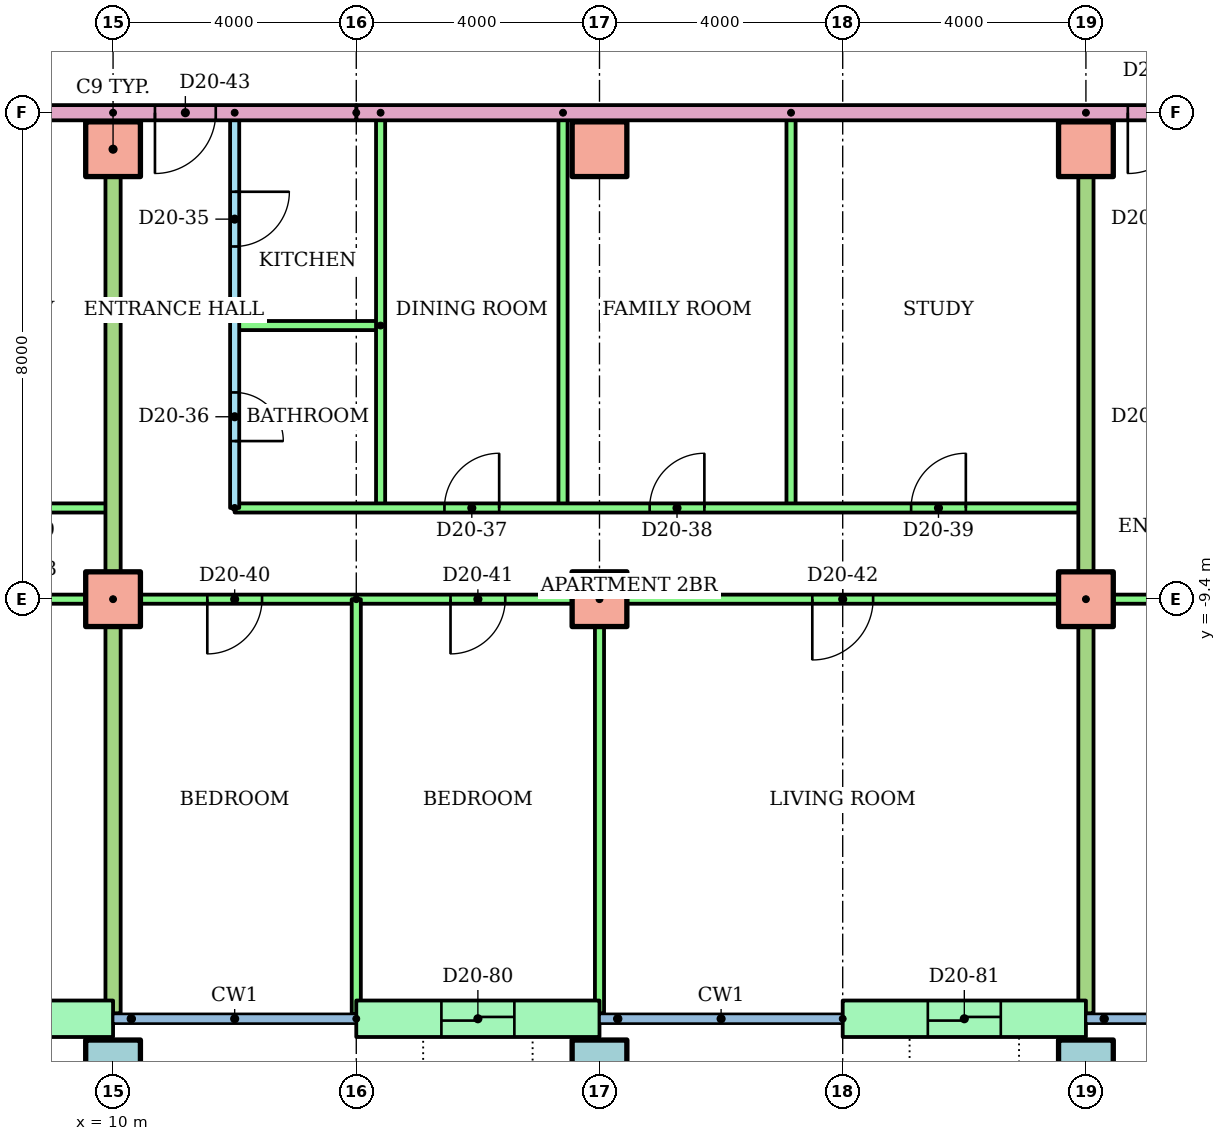
"""IFC4 building model, lengths in metres.
Left out: names, types, materials, properties, quantities, classifications, styles, units other than length and angle.
Written with IfcOpenShell. Run it as: python <this file> out.ifc"""

import sys

from ifc_helpers import new_model, si_unit, direction, frame, frame_2d, origin, origin_2d, place, context, subcontext, project, spatial, rectangle, hollow_rectangle, extrude, element, fill, save


model = new_model("IFC4")
c1 = context("Model", 3, precision=1e-05, world=origin(), true_north=direction((0.0, 1.0)))
c2 = subcontext(c1, "Body", "Model", "MODEL_VIEW")
j1 = project(units=[si_unit("LENGTHUNIT", "METRE"), si_unit("PLANEANGLEUNIT", "RADIAN")], contexts=[c1])
p1 = place(None, origin())
s1 = spatial("IfcSite", under=j1, at=p1, CompositionType="ELEMENT")
p2 = place(p1, origin())
s2 = spatial("IfcBuilding", under=s1, at=p2, CompositionType="ELEMENT")
p3 = place(p2, frame((0.0, 0.0, 80.7)))
s3 = spatial("IfcBuildingStorey", under=s2, at=p3, CompositionType="ELEMENT", Elevation=80.7)
for number, where in (
    (1, (10.0, -17.1, 0.0)),
    (2, (18.0, -17.1, 0.0)),
    (3, (26.0, -17.1, 0.0)),
):
    element("IfcColumn", number, at=place(p3, frame(where)), inside=s3, PredefinedType="COLUMN", context=c2, shape_type="SweptSolid", body=[
        extrude(hollow_rectangle(XDim=0.9, YDim=0.9, WallThickness=0.045, at=origin_2d()), origin(), (0.0, 0.0, 1.0), 3.2),
    ])
for number, where in (
    (4, (10.0, -9.4, 0.0)),
    (5, (18.0, -9.4, 0.0)),
    (6, (26.0, -9.4, 0.0)),
    (7, (10.0, -2.0, 0.0)),
    (8, (18.0, -2.0, 0.0)),
    (9, (26.0, -2.0, 0.0)),
):
    element("IfcColumn", number, at=place(p3, frame(where)), inside=s3, PredefinedType="COLUMN", context=c2, shape_type="SweptSolid", body=[
        extrude(rectangle(XDim=0.9, YDim=0.9, at=origin_2d()), origin(), (0.0, 0.0, 1.0), 3.2),
    ])
p4 = place(p3, frame((6.0, -16.3, 0.0)))
e10 = element("IfcWall", 10, at=p4, inside=s3, PredefinedType="STANDARD", context=c2, shape_type="SweptSolid", body=[
    extrude(rectangle(XDim=4.0, YDim=0.6, at=frame_2d((2.0, 0.0))), origin(), (0.0, 0.0, 1.0), 2.92),
])
p5 = place(p4, frame((1.4, 0.0, 0.0)))
e11 = element("IfcOpeningElement", 11, at=p5, cuts=e10, PredefinedType="OPENING", context=c2, shape_type="SweptSolid", body=[
    extrude(rectangle(XDim=1.2, YDim=2.1, at=frame_2d((0.6, 1.05))), frame((0.0, 0.31, 0.0), z_axis=(0.0, -1.0, 0.0), x_axis=(1.0, 0.0, 0.0)), (0.0, 0.0, 1.0), 0.62),
])
p6 = place(p3, frame((14.0, -16.3, 0.0)))
e12 = element("IfcWall", 12, at=p6, inside=s3, PredefinedType="STANDARD", context=c2, shape_type="SweptSolid", body=[
    extrude(rectangle(XDim=4.0, YDim=0.6, at=frame_2d((2.0, 0.0))), origin(), (0.0, 0.0, 1.0), 2.92),
])
p7 = place(p6, frame((1.4, 0.0, 0.0)))
e13 = element("IfcOpeningElement", 13, at=p7, cuts=e12, PredefinedType="OPENING", context=c2, shape_type="SweptSolid", body=[
    extrude(rectangle(XDim=1.2, YDim=2.1, at=frame_2d((0.6, 1.05))), frame((0.0, 0.31, 0.0), z_axis=(0.0, -1.0, 0.0), x_axis=(1.0, 0.0, 0.0)), (0.0, 0.0, 1.0), 0.62),
])
p8 = place(p3, frame((22.0, -16.3, 0.0)))
e14 = element("IfcWall", 14, at=p8, inside=s3, PredefinedType="STANDARD", context=c2, shape_type="SweptSolid", body=[
    extrude(rectangle(XDim=4.0, YDim=0.6, at=frame_2d((2.0, 0.0))), origin(), (0.0, 0.0, 1.0), 2.92),
])
p9 = place(p8, frame((1.4, 0.0, 0.0)))
e15 = element("IfcOpeningElement", 15, at=p9, cuts=e14, PredefinedType="OPENING", context=c2, shape_type="SweptSolid", body=[
    extrude(rectangle(XDim=1.2, YDim=2.1, at=frame_2d((0.6, 1.05))), frame((0.0, 0.31, 0.0), z_axis=(0.0, -1.0, 0.0), x_axis=(1.0, 0.0, 0.0)), (0.0, 0.0, 1.0), 0.62),
])
p10 = place(p3, frame((-4.0, -7.9, 0.0)))
e16 = element("IfcWall", 16, at=p10, inside=s3, PredefinedType="PARTITIONING", context=c2, shape_type="SweptSolid", body=[
    extrude(rectangle(XDim=14.0, YDim=0.15, at=frame_2d((7.0, 0.0))), origin(), (0.0, 0.0, 1.0), 2.4),
])
p11 = place(p10, frame((4.325, 0.0, 0.0)))
e17 = element("IfcOpeningElement", 17, at=p11, cuts=e16, PredefinedType="OPENING", context=c2, shape_type="SweptSolid", body=[
    extrude(rectangle(XDim=0.9, YDim=2.1, at=frame_2d((0.45, 1.05))), frame((0.0, 0.085, 0.0), z_axis=(0.0, -1.0, 0.0), x_axis=(1.0, 0.0, 0.0)), (0.0, 0.0, 1.0), 0.17),
])
p12 = place(p10, frame((8.575, 0.0, 0.0)))
e18 = element("IfcOpeningElement", 18, at=p12, cuts=e16, PredefinedType="OPENING", context=c2, shape_type="SweptSolid", body=[
    extrude(rectangle(XDim=0.9, YDim=2.1, at=frame_2d((0.45, 1.05))), frame((0.0, 0.085, 0.0), z_axis=(0.0, -1.0, 0.0), x_axis=(1.0, 0.0, 0.0)), (0.0, 0.0, 1.0), 0.17),
])
p13 = place(p10, frame((12.0, 0.0, 0.0)))
e19 = element("IfcOpeningElement", 19, at=p13, cuts=e16, PredefinedType="OPENING", context=c2, shape_type="SweptSolid", body=[
    extrude(rectangle(XDim=0.9, YDim=2.1, at=frame_2d((0.45, 1.05))), frame((0.0, 0.085, 0.0), z_axis=(0.0, -1.0, 0.0), x_axis=(1.0, 0.0, 0.0)), (0.0, 0.0, 1.0), 0.17),
])
p14 = place(p3, frame((10.0, -9.4, 0.0), z_axis=(0.0, 0.0, 1.0), x_axis=(-1.0, 0.0, 0.0)))
e20 = element("IfcWall", 20, at=p14, inside=s3, PredefinedType="PARTITIONING", context=c2, shape_type="SweptSolid", body=[
    extrude(rectangle(XDim=16.0, YDim=0.15, at=frame_2d((8.0, 0.0))), origin(), (0.0, 0.0, 1.0), 2.4),
])
p15 = place(p14, frame((13.55, 0.0, 0.0)))
e21 = element("IfcOpeningElement", 21, at=p15, cuts=e20, PredefinedType="OPENING", context=c2, shape_type="SweptSolid", body=[
    extrude(rectangle(XDim=0.9, YDim=2.1, at=frame_2d((0.45, 1.05))), frame((0.0, 0.085, 0.0), z_axis=(0.0, -1.0, 0.0), x_axis=(1.0, 0.0, 0.0)), (0.0, 0.0, 1.0), 0.17),
])
p16 = place(p14, frame((9.5, 0.0, 0.0)))
e22 = element("IfcOpeningElement", 22, at=p16, cuts=e20, PredefinedType="OPENING", context=c2, shape_type="SweptSolid", body=[
    extrude(rectangle(XDim=1.0, YDim=2.1, at=frame_2d((0.5, 1.05))), frame((0.0, 0.085, 0.0), z_axis=(0.0, -1.0, 0.0), x_axis=(1.0, 0.0, 0.0)), (0.0, 0.0, 1.0), 0.17),
])
p17 = place(p14, frame((5.55, 0.0, 0.0)))
e23 = element("IfcOpeningElement", 23, at=p17, cuts=e20, PredefinedType="OPENING", context=c2, shape_type="SweptSolid", body=[
    extrude(rectangle(XDim=0.9, YDim=2.1, at=frame_2d((0.45, 1.05))), frame((0.0, 0.085, 0.0), z_axis=(0.0, -1.0, 0.0), x_axis=(1.0, 0.0, 0.0)), (0.0, 0.0, 1.0), 0.17),
])
p18 = place(p14, frame((1.55, 0.0, 0.0)))
e24 = element("IfcOpeningElement", 24, at=p18, cuts=e20, PredefinedType="OPENING", context=c2, shape_type="SweptSolid", body=[
    extrude(rectangle(XDim=0.9, YDim=2.1, at=frame_2d((0.45, 1.05))), frame((0.0, 0.085, 0.0), z_axis=(0.0, -1.0, 0.0), x_axis=(1.0, 0.0, 0.0)), (0.0, 0.0, 1.0), 0.17),
])
p19 = place(p3, frame((12.0, -1.4, 0.0), z_axis=(0.0, 0.0, 1.0), x_axis=(0.0, -1.0, 0.0)))
e25 = element("IfcWall", 25, at=p19, inside=s3, PredefinedType="PARTITIONING", context=c2, shape_type="SweptSolid", body=[
    extrude(rectangle(XDim=6.5, YDim=0.15, at=frame_2d((3.25, 0.0))), origin(), (0.0, 0.0, 1.0), 2.4),
])
p20 = place(p19, frame((1.3, 0.0, 0.0)))
e26 = element("IfcOpeningElement", 26, at=p20, cuts=e25, PredefinedType="OPENING", context=c2, shape_type="SweptSolid", body=[
    extrude(rectangle(XDim=0.9, YDim=2.1, at=frame_2d((0.45, 1.05))), frame((0.0, 0.085, 0.0), z_axis=(0.0, -1.0, 0.0), x_axis=(1.0, 0.0, 0.0)), (0.0, 0.0, 1.0), 0.17),
])
p21 = place(p19, frame((4.6, 0.0, 0.0)))
e27 = element("IfcOpeningElement", 27, at=p21, cuts=e25, PredefinedType="OPENING", context=c2, shape_type="SweptSolid", body=[
    extrude(rectangle(XDim=0.8, YDim=2.1, at=frame_2d((0.4, 1.05))), frame((0.0, 0.085, 0.0), z_axis=(0.0, -1.0, 0.0), x_axis=(1.0, 0.0, 0.0)), (0.0, 0.0, 1.0), 0.17),
])
p22 = place(p3, frame((14.4, -4.9, 0.0), z_axis=(0.0, 0.0, 1.0), x_axis=(-1.0, 0.0, 0.0)))
e28 = element("IfcWall", 28, at=p22, inside=s3, PredefinedType="PARTITIONING", context=c2, shape_type="SweptSolid", body=[
    extrude(rectangle(XDim=2.4, YDim=0.15, at=frame_2d((1.2, 0.0))), origin(), (0.0, 0.0, 1.0), 2.4),
])
for number, where, z_axis, x_axis in (
    (29, (14.4, -1.4, 0.0), (0.0, 0.0, 1.0), (0.0, -1.0, 0.0)),
    (30, (17.4, -1.4, 0.0), (0.0, 0.0, 1.0), (0.0, -1.0, 0.0)),
    (31, (21.15, -1.4, 0.0), (0.0, 0.0, 1.0), (0.0, -1.0, 0.0)),
):
    element("IfcWall", number, at=place(p3, frame(where, z_axis=z_axis, x_axis=x_axis)), inside=s3, PredefinedType="PARTITIONING", context=c2, shape_type="SweptSolid", body=[
        extrude(rectangle(XDim=6.5, YDim=0.15, at=frame_2d((3.25, 0.0))), origin(), (0.0, 0.0, 1.0), 2.4),
    ])
p23 = place(p3, frame((12.0, -7.9, 0.0)))
e32 = element("IfcWall", 32, at=p23, inside=s3, PredefinedType="PARTITIONING", context=c2, shape_type="SweptSolid", body=[
    extrude(rectangle(XDim=14.0, YDim=0.15, at=frame_2d((7.0, 0.0))), origin(), (0.0, 0.0, 1.0), 2.4),
])
p24 = place(p23, frame((3.45, 0.0, 0.0)))
e33 = element("IfcOpeningElement", 33, at=p24, cuts=e32, PredefinedType="OPENING", context=c2, shape_type="SweptSolid", body=[
    extrude(rectangle(XDim=0.9, YDim=2.1, at=frame_2d((0.45, 1.05))), frame((0.0, 0.085, 0.0), z_axis=(0.0, -1.0, 0.0), x_axis=(1.0, 0.0, 0.0)), (0.0, 0.0, 1.0), 0.17),
])
p25 = place(p23, frame((6.825, 0.0, 0.0)))
e34 = element("IfcOpeningElement", 34, at=p25, cuts=e32, PredefinedType="OPENING", context=c2, shape_type="SweptSolid", body=[
    extrude(rectangle(XDim=0.9, YDim=2.1, at=frame_2d((0.45, 1.05))), frame((0.0, 0.085, 0.0), z_axis=(0.0, -1.0, 0.0), x_axis=(1.0, 0.0, 0.0)), (0.0, 0.0, 1.0), 0.17),
])
p26 = place(p23, frame((11.125, 0.0, 0.0)))
e35 = element("IfcOpeningElement", 35, at=p26, cuts=e32, PredefinedType="OPENING", context=c2, shape_type="SweptSolid", body=[
    extrude(rectangle(XDim=0.9, YDim=2.1, at=frame_2d((0.45, 1.05))), frame((0.0, 0.085, 0.0), z_axis=(0.0, -1.0, 0.0), x_axis=(1.0, 0.0, 0.0)), (0.0, 0.0, 1.0), 0.17),
])
p27 = place(p3, frame((26.0, -9.4, 0.0), z_axis=(0.0, 0.0, 1.0), x_axis=(-1.0, 0.0, 0.0)))
e36 = element("IfcWall", 36, at=p27, inside=s3, PredefinedType="PARTITIONING", context=c2, shape_type="SweptSolid", body=[
    extrude(rectangle(XDim=16.0, YDim=0.15, at=frame_2d((8.0, 0.0))), origin(), (0.0, 0.0, 1.0), 2.4),
])
p28 = place(p27, frame((13.55, 0.0, 0.0)))
e37 = element("IfcOpeningElement", 37, at=p28, cuts=e36, PredefinedType="OPENING", context=c2, shape_type="SweptSolid", body=[
    extrude(rectangle(XDim=0.9, YDim=2.1, at=frame_2d((0.45, 1.05))), frame((0.0, 0.085, 0.0), z_axis=(0.0, -1.0, 0.0), x_axis=(1.0, 0.0, 0.0)), (0.0, 0.0, 1.0), 0.17),
])
p29 = place(p27, frame((9.55, 0.0, 0.0)))
e38 = element("IfcOpeningElement", 38, at=p29, cuts=e36, PredefinedType="OPENING", context=c2, shape_type="SweptSolid", body=[
    extrude(rectangle(XDim=0.9, YDim=2.1, at=frame_2d((0.45, 1.05))), frame((0.0, 0.085, 0.0), z_axis=(0.0, -1.0, 0.0), x_axis=(1.0, 0.0, 0.0)), (0.0, 0.0, 1.0), 0.17),
])
p30 = place(p27, frame((3.5, 0.0, 0.0)))
e39 = element("IfcOpeningElement", 39, at=p30, cuts=e36, PredefinedType="OPENING", context=c2, shape_type="SweptSolid", body=[
    extrude(rectangle(XDim=1.0, YDim=2.1, at=frame_2d((0.5, 1.05))), frame((0.0, 0.085, 0.0), z_axis=(0.0, -1.0, 0.0), x_axis=(1.0, 0.0, 0.0)), (0.0, 0.0, 1.0), 0.17),
])
p31 = place(p3, frame((14.0, -9.4, 0.0), z_axis=(0.0, 0.0, 1.0), x_axis=(0.0, -1.0, 0.0)))
e40 = element("IfcWall", 40, at=p31, inside=s3, PredefinedType="PARTITIONING", context=c2, shape_type="SweptSolid", body=[
    extrude(rectangle(XDim=6.821, YDim=0.15, at=frame_2d((3.411, 0.0))), origin(), (0.0, 0.0, 1.0), 2.4),
])
p32 = place(p3, frame((18.0, -9.4, 0.0), z_axis=(0.0, 0.0, 1.0), x_axis=(0.0, -1.0, 0.0)))
e41 = element("IfcWall", 41, at=p32, inside=s3, PredefinedType="PARTITIONING", context=c2, shape_type="SweptSolid", body=[
    extrude(rectangle(XDim=6.81, YDim=0.15, at=frame_2d((3.405, 0.0))), origin(), (0.0, 0.0, 1.0), 2.4),
])
p33 = place(p3, frame((10.0, -1.4, 0.0), z_axis=(0.0, 0.0, 1.0), x_axis=(0.0, -1.0, 0.0)))
e42 = element("IfcWall", 42, at=p33, inside=s3, PredefinedType="PARTITIONING", context=c2, shape_type="SweptSolid", body=[
    extrude(rectangle(XDim=14.81, YDim=0.25, at=frame_2d((7.405, 0.0))), origin(), (0.0, 0.0, 1.0), 2.4),
])
p34 = place(p3, frame((40.62, -9.4, 0.0), z_axis=(0.0, 0.0, 1.0), x_axis=(-1.0, 0.0, 0.0)))
e43 = element("IfcWall", 43, at=p34, inside=s3, PredefinedType="PARTITIONING", context=c2, shape_type="SweptSolid", body=[
    extrude(rectangle(XDim=14.62, YDim=0.15, at=frame_2d((7.31, 0.0))), origin(), (0.0, 0.0, 1.0), 2.4),
])
p35 = place(p34, frame((12.17, 0.0, 0.0)))
e44 = element("IfcOpeningElement", 44, at=p35, cuts=e43, PredefinedType="OPENING", context=c2, shape_type="SweptSolid", body=[
    extrude(rectangle(XDim=0.9, YDim=2.1, at=frame_2d((0.45, 1.05))), frame((0.0, 0.085, 0.0), z_axis=(0.0, -1.0, 0.0), x_axis=(1.0, 0.0, 0.0)), (0.0, 0.0, 1.0), 0.17),
])
p36 = place(p34, frame((8.12, 0.0, 0.0)))
e45 = element("IfcOpeningElement", 45, at=p36, cuts=e43, PredefinedType="OPENING", context=c2, shape_type="SweptSolid", body=[
    extrude(rectangle(XDim=1.0, YDim=2.1, at=frame_2d((0.5, 1.05))), frame((0.0, 0.085, 0.0), z_axis=(0.0, -1.0, 0.0), x_axis=(1.0, 0.0, 0.0)), (0.0, 0.0, 1.0), 0.17),
])
p37 = place(p34, frame((2.97, 0.0, 0.0)))
e46 = element("IfcOpeningElement", 46, at=p37, cuts=e43, PredefinedType="OPENING", context=c2, shape_type="SweptSolid", body=[
    extrude(rectangle(XDim=0.9, YDim=2.1, at=frame_2d((0.45, 1.05))), frame((0.0, 0.085, 0.0), z_axis=(0.0, -1.0, 0.0), x_axis=(1.0, 0.0, 0.0)), (0.0, 0.0, 1.0), 0.17),
])
p38 = place(p3, frame((26.0, -1.4, 0.0), z_axis=(0.0, 0.0, 1.0), x_axis=(0.0, -1.0, 0.0)))
e47 = element("IfcWall", 47, at=p38, inside=s3, PredefinedType="PARTITIONING", context=c2, shape_type="SweptSolid", body=[
    extrude(rectangle(XDim=14.81, YDim=0.25, at=frame_2d((7.405, 0.0))), origin(), (0.0, 0.0, 1.0), 2.4),
])
p39 = place(p3, frame((29.0, -1.4, 0.0), z_axis=(0.0, 0.0, 1.0), x_axis=(-1.0, 0.0, 0.0)))
e48 = element("IfcWall", 48, at=p39, inside=s3, PredefinedType="PARTITIONING", context=c2, shape_type="SweptSolid", body=[
    extrude(rectangle(XDim=15.0, YDim=0.25, at=frame_2d((7.5, 0.0))), origin(), (0.0, 0.0, 1.0), 2.4),
])
p40 = place(p39, frame((1.311, 0.0, 0.0)))
e49 = element("IfcOpeningElement", 49, at=p40, cuts=e48, PredefinedType="OPENING", context=c2, shape_type="SweptSolid", body=[
    extrude(rectangle(XDim=1.0, YDim=2.1, at=frame_2d((0.5, 1.05))), frame((0.0, 0.135, 0.0), z_axis=(0.0, -1.0, 0.0), x_axis=(1.0, 0.0, 0.0)), (0.0, 0.0, 1.0), 0.27),
])
p41 = place(p3, frame((14.0, -1.4, 0.0), z_axis=(0.0, 0.0, 1.0), x_axis=(-1.0, 0.0, 0.0)))
e50 = element("IfcWall", 50, at=p41, inside=s3, PredefinedType="PARTITIONING", context=c2, shape_type="SweptSolid", body=[
    extrude(rectangle(XDim=28.0, YDim=0.25, at=frame_2d((14.0, 0.0))), origin(), (0.0, 0.0, 1.0), 2.4),
])
p42 = place(p41, frame((20.689, 0.0, 0.0)))
e51 = element("IfcOpeningElement", 51, at=p42, cuts=e50, PredefinedType="OPENING", context=c2, shape_type="SweptSolid", body=[
    extrude(rectangle(XDim=1.0, YDim=2.1, at=frame_2d((0.5, 1.05))), frame((0.0, 0.135, 0.0), z_axis=(0.0, -1.0, 0.0), x_axis=(1.0, 0.0, 0.0)), (0.0, 0.0, 1.0), 0.27),
])
p43 = place(p41, frame((18.311, 0.0, 0.0)))
e52 = element("IfcOpeningElement", 52, at=p43, cuts=e50, PredefinedType="OPENING", context=c2, shape_type="SweptSolid", body=[
    extrude(rectangle(XDim=1.0, YDim=2.1, at=frame_2d((0.5, 1.05))), frame((0.0, 0.135, 0.0), z_axis=(0.0, -1.0, 0.0), x_axis=(1.0, 0.0, 0.0)), (0.0, 0.0, 1.0), 0.27),
])
p44 = place(p41, frame((2.311, 0.0, 0.0)))
e53 = element("IfcOpeningElement", 53, at=p44, cuts=e50, PredefinedType="OPENING", context=c2, shape_type="SweptSolid", body=[
    extrude(rectangle(XDim=1.0, YDim=2.1, at=frame_2d((0.5, 1.05))), frame((0.0, 0.135, 0.0), z_axis=(0.0, -1.0, 0.0), x_axis=(1.0, 0.0, 0.0)), (0.0, 0.0, 1.0), 0.27),
])
p45 = place(p20, origin())
e54 = element("IfcDoor", 54, at=p45, inside=s3, OperationType="SINGLE_SWING_LEFT", PredefinedType="DOOR", context=c2, shape_type="SweptSolid", body=[
    extrude(rectangle(XDim=0.9, YDim=2.1, at=frame_2d((0.45, 1.05))), frame((0.0, 0.025, 0.0), z_axis=(0.0, -1.0, 0.0), x_axis=(1.0, 0.0, 0.0)), (0.0, 0.0, 1.0), 0.05),
])
fill(e26, e54)
p46 = place(p21, origin())
e55 = element("IfcDoor", 55, at=p46, inside=s3, OperationType="SINGLE_SWING_RIGHT", PredefinedType="DOOR", context=c2, shape_type="SweptSolid", body=[
    extrude(rectangle(XDim=0.8, YDim=2.1, at=frame_2d((0.4, 1.05))), frame((0.0, 0.025, 0.0), z_axis=(0.0, -1.0, 0.0), x_axis=(1.0, 0.0, 0.0)), (0.0, 0.0, 1.0), 0.05),
])
fill(e27, e55)
p47 = place(p24, origin())
e56 = element("IfcDoor", 56, at=p47, inside=s3, OperationType="SINGLE_SWING_RIGHT", PredefinedType="DOOR", context=c2, shape_type="SweptSolid", body=[
    extrude(rectangle(XDim=0.9, YDim=2.1, at=frame_2d((0.45, 1.05))), frame((0.0, 0.025, 0.0), z_axis=(0.0, -1.0, 0.0), x_axis=(1.0, 0.0, 0.0)), (0.0, 0.0, 1.0), 0.05),
])
fill(e33, e56)
p48 = place(p25, origin())
e57 = element("IfcDoor", 57, at=p48, inside=s3, OperationType="SINGLE_SWING_RIGHT", PredefinedType="DOOR", context=c2, shape_type="SweptSolid", body=[
    extrude(rectangle(XDim=0.9, YDim=2.1, at=frame_2d((0.45, 1.05))), frame((0.0, 0.025, 0.0), z_axis=(0.0, -1.0, 0.0), x_axis=(1.0, 0.0, 0.0)), (0.0, 0.0, 1.0), 0.05),
])
fill(e34, e57)
p49 = place(p26, origin())
e58 = element("IfcDoor", 58, at=p49, inside=s3, OperationType="SINGLE_SWING_RIGHT", PredefinedType="DOOR", context=c2, shape_type="SweptSolid", body=[
    extrude(rectangle(XDim=0.9, YDim=2.1, at=frame_2d((0.45, 1.05))), frame((0.0, 0.025, 0.0), z_axis=(0.0, -1.0, 0.0), x_axis=(1.0, 0.0, 0.0)), (0.0, 0.0, 1.0), 0.05),
])
fill(e35, e58)
p50 = place(p28, origin())
e59 = element("IfcDoor", 59, at=p50, inside=s3, OperationType="SINGLE_SWING_RIGHT", PredefinedType="DOOR", context=c2, shape_type="SweptSolid", body=[
    extrude(rectangle(XDim=0.9, YDim=2.1, at=frame_2d((0.45, 1.05))), frame((0.0, 0.025, 0.0), z_axis=(0.0, -1.0, 0.0), x_axis=(1.0, 0.0, 0.0)), (0.0, 0.0, 1.0), 0.05),
])
fill(e37, e59)
p51 = place(p29, origin())
e60 = element("IfcDoor", 60, at=p51, inside=s3, OperationType="SINGLE_SWING_RIGHT", PredefinedType="DOOR", context=c2, shape_type="SweptSolid", body=[
    extrude(rectangle(XDim=0.9, YDim=2.1, at=frame_2d((0.45, 1.05))), frame((0.0, 0.025, 0.0), z_axis=(0.0, -1.0, 0.0), x_axis=(1.0, 0.0, 0.0)), (0.0, 0.0, 1.0), 0.05),
])
fill(e38, e60)
p52 = place(p30, origin())
e61 = element("IfcDoor", 61, at=p52, inside=s3, OperationType="SINGLE_SWING_RIGHT", PredefinedType="DOOR", context=c2, shape_type="SweptSolid", body=[
    extrude(rectangle(XDim=1.0, YDim=2.1, at=frame_2d((0.5, 1.05))), frame((0.0, 0.025, 0.0), z_axis=(0.0, -1.0, 0.0), x_axis=(1.0, 0.0, 0.0)), (0.0, 0.0, 1.0), 0.05),
])
fill(e39, e61)
p53 = place(p44, origin())
e62 = element("IfcDoor", 62, at=p53, inside=s3, OperationType="SINGLE_SWING_RIGHT", PredefinedType="DOOR", context=c2, shape_type="SweptSolid", body=[
    extrude(rectangle(XDim=1.0, YDim=2.1, at=frame_2d((0.5, 1.05))), frame((0.0, 0.025, 0.0), z_axis=(0.0, -1.0, 0.0), x_axis=(1.0, 0.0, 0.0)), (0.0, 0.0, 1.0), 0.05),
])
fill(e53, e62)
p54 = place(p40, origin())
e63 = element("IfcDoor", 63, at=p54, inside=s3, OperationType="SINGLE_SWING_RIGHT", PredefinedType="DOOR", context=c2, shape_type="SweptSolid", body=[
    extrude(rectangle(XDim=1.0, YDim=2.1, at=frame_2d((0.5, 1.05))), frame((0.0, 0.025, 0.0), z_axis=(0.0, -1.0, 0.0), x_axis=(1.0, 0.0, 0.0)), (0.0, 0.0, 1.0), 0.05),
])
fill(e49, e63)
p55 = place(p7, origin())
e64 = element("IfcDoor", 64, at=p55, inside=s3, OperationType="SLIDING_TO_LEFT", PredefinedType="DOOR", context=c2, shape_type="SweptSolid", body=[
    extrude(rectangle(XDim=1.2, YDim=2.1, at=frame_2d((0.6, 1.05))), frame((0.0, 0.025, 0.0), z_axis=(0.0, -1.0, 0.0), x_axis=(1.0, 0.0, 0.0)), (0.0, 0.0, 1.0), 0.05),
])
fill(e13, e64)
p56 = place(p9, origin())
e65 = element("IfcDoor", 65, at=p56, inside=s3, OperationType="SLIDING_TO_LEFT", PredefinedType="DOOR", context=c2, shape_type="SweptSolid", body=[
    extrude(rectangle(XDim=1.2, YDim=2.1, at=frame_2d((0.6, 1.05))), frame((0.0, 0.025, 0.0), z_axis=(0.0, -1.0, 0.0), x_axis=(1.0, 0.0, 0.0)), (0.0, 0.0, 1.0), 0.05),
])
fill(e15, e65)
save(model, sys.argv[1])
